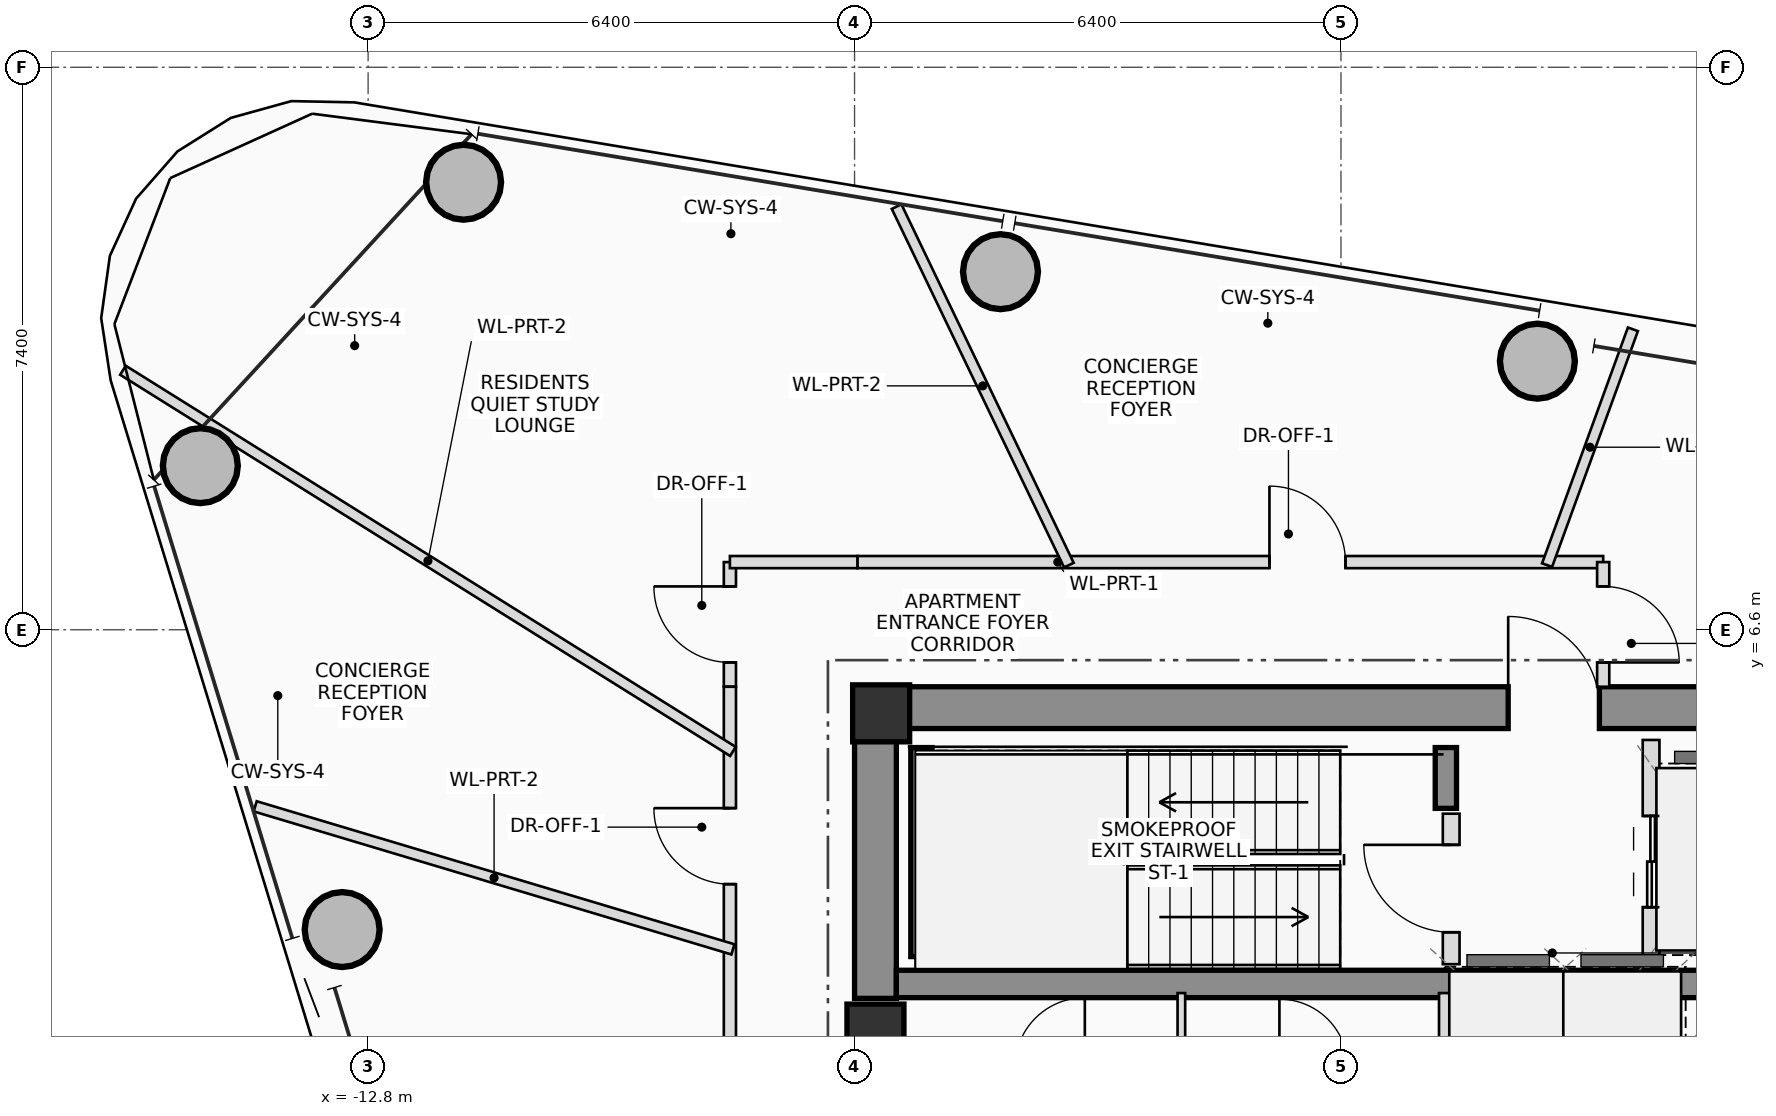
"""IFC4 building model, lengths in metres.
Left out: names, types, materials, properties, quantities, classifications, styles, units other than length and angle.
Written with IfcOpenShell. Run it as: python <this file> out.ifc"""

import sys

from ifc_helpers import new_model, si_unit, direction, frame, frame_2d, origin, origin_2d, place, context, subcontext, project, spatial, rectangle, hollow_circle, extrude, source, transform, mapped, element, fill, save


model = new_model("IFC4")
c1 = context("Model", 3, precision=1e-05, world=origin(), true_north=direction((0.0, 1.0)))
c2 = subcontext(c1, "Body", "Model", "MODEL_VIEW")
j1 = project(units=[si_unit("LENGTHUNIT", "METRE"), si_unit("PLANEANGLEUNIT", "RADIAN")], contexts=[c1])
p1 = place(None, origin())
s1 = spatial("IfcSite", under=j1, at=p1, CompositionType="ELEMENT")
p2 = place(p1, origin())
s2 = spatial("IfcBuilding", under=s1, at=p2, CompositionType="ELEMENT")
p3 = place(p2, frame((0.0, 0.0, 249.05)))
s3 = spatial("IfcBuildingStorey", under=s2, at=p3, CompositionType="ELEMENT", Elevation=249.05)
m1 = source(origin(), c2, "Body", "SweptSolid", [
    extrude(rectangle(XDim=0.75, YDim=0.75, at=origin_2d()), origin(), (0.0, 0.0, 1.0), 3.4),
])
p4 = place(p3, frame((-6.05, 5.5, 0.0), z_axis=(0.0, 0.0, 1.0), x_axis=(1.0, 0.0, 0.0)))
e1 = element("IfcColumn", 1, at=p4, inside=s3, PredefinedType="COLUMN", context=c2, shape_type="MappedRepresentation", body=[
    mapped(m1, transform((0.0, 0.0, 0.0), scale=1.0)),
])
p5 = place(p3, frame((-6.4, 5.575, 0.0), z_axis=(0.0, 0.0, 1.0), x_axis=(1.0, 0.0, 0.0)))
e2 = element("IfcWall", 2, at=p5, inside=s3, PredefinedType="SHEAR", context=c2, shape_type="SweptSolid", body=[
    extrude(rectangle(XDim=12.8, YDim=0.55, at=frame_2d((6.4, 0.0))), origin(), (0.0, 0.0, 1.0), 3.4),
])
p6 = place(p5, frame((8.6, 0.0, 0.0)))
e3 = element("IfcOpeningElement", 3, at=p6, cuts=e2, PredefinedType="OPENING", context=c2, shape_type="SweptSolid", body=[
    extrude(rectangle(XDim=1.2, YDim=2.2, at=frame_2d((0.6, 1.1))), frame((0.0, 0.285, 0.0), z_axis=(0.0, -1.0, 0.0), x_axis=(1.0, 0.0, 0.0)), (0.0, 0.0, 1.0), 0.57),
])
p7 = place(p3, frame((-6.125, 1.75, 0.0), z_axis=(0.0, 0.0, 1.0), x_axis=(0.0, 1.0, 0.0)))
e4 = element("IfcWall", 4, at=p7, inside=s3, PredefinedType="SHEAR", context=c2, shape_type="SweptSolid", body=[
    extrude(rectangle(XDim=3.55, YDim=0.55, at=frame_2d((1.775, 0.0))), origin(), (0.0, 0.0, 1.0), 3.4),
])
p8 = place(p3, frame((-5.85, 1.94, 0.0), z_axis=(0.0, 0.0, 1.0), x_axis=(1.0, 0.0, 0.0)))
e5 = element("IfcWall", 5, at=p8, inside=s3, PredefinedType="SHEAR", context=c2, shape_type="SweptSolid", body=[
    extrude(rectangle(XDim=11.7, YDim=0.36, at=frame_2d((5.85, 0.0))), origin(), (0.0, 0.0, 1.0), 3.4),
])
p9 = place(p3, frame((-5.52, 2.3, 0.0), z_axis=(0.0, 0.0, 1.0), x_axis=(0.0, 1.0, 0.0)))
e6 = element("IfcWall", 6, at=p9, inside=s3, PredefinedType="SHEAR", context=c2, shape_type="SweptSolid", body=[
    extrude(rectangle(XDim=2.75, YDim=0.28, at=frame_2d((1.375, 0.0))), origin(), (0.0, 0.0, 1.0), 3.4),
])
p10 = place(p3, frame((1.38, 4.25, 0.0), z_axis=(0.0, 0.0, 1.0), x_axis=(0.0, 1.0, 0.0)))
e7 = element("IfcWall", 7, at=p10, inside=s3, PredefinedType="SHEAR", context=c2, shape_type="SweptSolid", body=[
    extrude(rectangle(XDim=0.8, YDim=0.28, at=frame_2d((0.4, 0.0))), origin(), (0.0, 0.0, 1.0), 3.4),
])
p11 = place(p3, frame((-6.125, 1.3, 0.0), z_axis=(0.0, 0.0, 1.0), x_axis=(1.0, 0.0, 0.0)))
e8 = element("IfcColumn", 8, at=p11, inside=s3, PredefinedType="COLUMN", context=c2, shape_type="MappedRepresentation", body=[
    mapped(m1, transform((0.0, 0.0, 0.0), scale=1.0)),
])
m2 = source(origin(), c2, "Body", "SweptSolid", [
    extrude(hollow_circle(Radius=0.5, WallThickness=0.04, at=origin_2d()), origin(), (0.0, 0.0, 1.0), 3.4),
])
for number, where, z_axis, x_axis in (
    (9, (2.584, 10.134, 0.0), (0.0, 0.0, 1.0), (1.0, 0.0, 0.0)),
    (10, (-4.48, 11.311, 0.0), (0.0, 0.0, 1.0), (1.0, 0.0, 0.0)),
    (11, (-11.544, 12.488, 0.0), (0.0, 0.0, 1.0), (1.0, 0.0, 0.0)),
    (12, (-15.008, 8.759, 0.0), (0.0, 0.0, 1.0), (1.0, 0.0, 0.0)),
    (13, (-13.142, 2.656, 0.0), (0.0, 0.0, 1.0), (1.0, 0.0, 0.0)),
):
    element("IfcColumn", number, at=place(p3, frame(where, z_axis=z_axis, x_axis=x_axis)), inside=s3, PredefinedType="COLUMN", context=c2, shape_type="MappedRepresentation", body=[
        mapped(m2, transform((0.0, 0.0, 0.0), scale=1.0)),
    ])
p12 = place(p3, frame((1.45, 2.2, 0.0), z_axis=(0.0, 0.0, 1.0), x_axis=(0.0, 1.0, 0.0)))
e14 = element("IfcWall", 14, at=p12, inside=s3, PredefinedType="PLUMBINGWALL", context=c2, shape_type="SweptSolid", body=[
    extrude(rectangle(XDim=1.98, YDim=0.22, at=frame_2d((0.99, 0.0))), origin(), (0.0, 0.0, 1.0), 3.16),
])
p13 = place(p12, frame((0.42, 0.0, 0.0)))
e15 = element("IfcOpeningElement", 15, at=p13, cuts=e14, PredefinedType="OPENING", context=c2, shape_type="SweptSolid", body=[
    extrude(rectangle(XDim=1.15, YDim=2.15, at=frame_2d((0.575, 1.075))), frame((0.0, 0.12, 0.0), z_axis=(0.0, -1.0, 0.0), x_axis=(1.0, 0.0, 0.0)), (0.0, 0.0, 1.0), 0.24),
])
p14 = place(p3, frame((4.08, 2.2, 0.0), z_axis=(0.0, 0.0, 1.0), x_axis=(0.0, 1.0, 0.0)))
e16 = element("IfcWall", 16, at=p14, inside=s3, PredefinedType="PLUMBINGWALL", context=c2, shape_type="SweptSolid", body=[
    extrude(rectangle(XDim=2.95, YDim=0.22, at=frame_2d((1.475, 0.0))), origin(), (0.0, 0.0, 1.0), 3.16),
])
p15 = place(p14, frame((0.75, 0.0, 0.0)))
e17 = element("IfcOpeningElement", 17, at=p15, cuts=e16, PredefinedType="OPENING", context=c2, shape_type="SweptSolid", body=[
    extrude(rectangle(XDim=1.2, YDim=2.25, at=frame_2d((0.6, 1.125))), frame((0.0, 0.12, 0.0), z_axis=(0.0, -1.0, 0.0), x_axis=(1.0, 0.0, 0.0)), (0.0, 0.0, 1.0), 0.24),
])
p16 = place(p3, frame((-2.1, 0.84, 0.0), z_axis=(0.0, 0.0, 1.0), x_axis=(0.0, 1.0, 0.0)))
e18 = element("IfcWall", 18, at=p16, inside=s3, PredefinedType="PARTITIONING", context=c2, shape_type="SweptSolid", body=[
    extrude(rectangle(XDim=0.98, YDim=0.1, at=frame_2d((0.49, 0.0))), origin(), (0.0, 0.0, 1.0), 3.16),
])
for number, where, z_axis, x_axis in (
    (19, (1.38, 0.84, 0.0), (0.0, 0.0, 1.0), (0.0, 1.0, 0.0)),
    (20, (3.02, 0.84, 0.0), (0.0, 0.0, 1.0), (0.0, 1.0, 0.0)),
    (21, (4.38, 0.84, 0.0), (0.0, 0.0, 1.0), (0.0, 1.0, 0.0)),
):
    element("IfcWall", number, at=place(p3, frame(where, z_axis=z_axis, x_axis=x_axis)), inside=s3, PredefinedType="PLUMBINGWALL", context=c2, shape_type="SweptSolid", body=[
        extrude(rectangle(XDim=0.98, YDim=0.18, at=frame_2d((0.49, 0.0))), origin(), (0.0, 0.0, 1.0), 3.16),
    ])
p17 = place(p3, frame((-8.04, 5.85, 0.0), z_axis=(0.0, 0.0, 1.0), x_axis=(0.0, 1.0, 0.0)))
e22 = element("IfcWall", 22, at=p17, inside=s3, PredefinedType="PARTITIONING", context=c2, shape_type="SweptSolid", body=[
    extrude(rectangle(XDim=1.64, YDim=0.16, at=frame_2d((0.82, 0.0))), origin(), (0.0, 0.0, 1.0), 2.565),
])
p18 = place(p17, frame((0.32, 0.0, 0.0)))
e23 = element("IfcOpeningElement", 23, at=p18, cuts=e22, PredefinedType="OPENING", context=c2, shape_type="SweptSolid", body=[
    extrude(rectangle(XDim=1.0, YDim=2.25, at=frame_2d((0.5, 1.125))), frame((0.0, 0.09, 0.0), z_axis=(0.0, -1.0, 0.0), x_axis=(1.0, 0.0, 0.0)), (0.0, 0.0, 1.0), 0.18),
])
p19 = place(p3, frame((-8.04, 7.49, 0.0), z_axis=(0.0, 0.0, 1.0), x_axis=(1.0, 0.0, 0.0)))
e24 = element("IfcWall", 24, at=p19, inside=s3, PredefinedType="PARTITIONING", context=c2, shape_type="SweptSolid", body=[
    extrude(rectangle(XDim=1.68, YDim=0.16, at=frame_2d((0.84, 0.0))), origin(), (0.0, 0.0, 1.0), 2.565),
])
p20 = place(p3, frame((-6.36, 7.49, 0.0), z_axis=(0.0, 0.0, 1.0), x_axis=(1.0, 0.0, 0.0)))
e25 = element("IfcWall", 25, at=p20, inside=s3, PredefinedType="PARTITIONING", context=c2, shape_type="SweptSolid", body=[
    extrude(rectangle(XDim=9.81, YDim=0.16, at=frame_2d((4.905, 0.0))), origin(), (0.0, 0.0, 1.0), 2.565),
])
p21 = place(p20, frame((5.419, 0.0, 0.0)))
e26 = element("IfcOpeningElement", 26, at=p21, cuts=e25, PredefinedType="OPENING", context=c2, shape_type="SweptSolid", body=[
    extrude(rectangle(XDim=1.0, YDim=2.25, at=frame_2d((0.5, 1.125))), frame((0.0, 0.09, 0.0), z_axis=(0.0, -1.0, 0.0), x_axis=(1.0, 0.0, 0.0)), (0.0, 0.0, 1.0), 0.18),
])
p22 = place(p3, frame((3.45, 7.49, 0.0), z_axis=(0.0, 0.0, 1.0), x_axis=(0.0, -1.0, 0.0)))
e27 = element("IfcWall", 27, at=p22, inside=s3, PredefinedType="PARTITIONING", context=c2, shape_type="SweptSolid", body=[
    extrude(rectangle(XDim=1.64, YDim=0.16, at=frame_2d((0.82, 0.0))), origin(), (0.0, 0.0, 1.0), 3.16),
])
p23 = place(p22, frame((0.32, 0.0, 0.0)))
e28 = element("IfcOpeningElement", 28, at=p23, cuts=e27, PredefinedType="OPENING", context=c2, shape_type="SweptSolid", body=[
    extrude(rectangle(XDim=1.0, YDim=2.25, at=frame_2d((0.5, 1.125))), frame((0.0, 0.09, 0.0), z_axis=(0.0, -1.0, 0.0), x_axis=(1.0, 0.0, 0.0)), (0.0, 0.0, 1.0), 0.18),
])
p24 = place(p3, frame((-8.04, -5.85, 0.0), z_axis=(0.0, 0.0, 1.0), x_axis=(0.0, 1.0, 0.0)))
e29 = element("IfcWall", 29, at=p24, inside=s3, PredefinedType="PARTITIONING", context=c2, shape_type="SweptSolid", body=[
    extrude(rectangle(XDim=11.7, YDim=0.16, at=frame_2d((5.85, 0.0))), origin(), (0.0, 0.0, 1.0), 2.565),
])
p25 = place(p24, frame((1.754, 0.0, 0.0)))
e30 = element("IfcOpeningElement", 30, at=p25, cuts=e29, PredefinedType="OPENING", context=c2, shape_type="SweptSolid", body=[
    extrude(rectangle(XDim=1.0, YDim=2.25, at=frame_2d((0.5, 1.125))), frame((0.0, 0.09, 0.0), z_axis=(0.0, -1.0, 0.0), x_axis=(1.0, 0.0, 0.0)), (0.0, 0.0, 1.0), 0.18),
])
p26 = place(p24, frame((5.8, 0.0, 0.0)))
e31 = element("IfcOpeningElement", 31, at=p26, cuts=e29, PredefinedType="OPENING", context=c2, shape_type="SweptSolid", body=[
    extrude(rectangle(XDim=1.0, YDim=2.25, at=frame_2d((0.5, 1.125))), frame((0.0, 0.09, 0.0), z_axis=(0.0, -1.0, 0.0), x_axis=(1.0, 0.0, 0.0)), (0.0, 0.0, 1.0), 0.18),
])
p27 = place(p24, frame((9.103, 0.0, 0.0)))
e32 = element("IfcOpeningElement", 32, at=p27, cuts=e29, PredefinedType="OPENING", context=c2, shape_type="SweptSolid", body=[
    extrude(rectangle(XDim=1.0, YDim=2.25, at=frame_2d((0.5, 1.125))), frame((0.0, 0.09, 0.0), z_axis=(0.0, -1.0, 0.0), x_axis=(1.0, 0.0, 0.0)), (0.0, 0.0, 1.0), 0.18),
])
p28 = place(p3, frame((2.712, 7.45, 0.0), z_axis=(0.0, 0.0, 1.0), x_axis=(0.341974588874, 0.9397092, 0.0)))
e33 = element("IfcWall", 33, at=p28, inside=s3, PredefinedType="PARTITIONING", context=c2, shape_type="SweptSolid", body=[
    extrude(rectangle(XDim=3.302, YDim=0.14, at=frame_2d((1.651, 0.0))), origin(), (0.0, 0.0, 1.0), 2.565),
])
p29 = place(p3, frame((-3.58, 7.45, 0.0), z_axis=(0.0, 0.0, 1.0), x_axis=(-0.433107149182, 0.901342441765, 0.0)))
e34 = element("IfcWall", 34, at=p29, inside=s3, PredefinedType="PARTITIONING", context=c2, shape_type="SweptSolid", body=[
    extrude(rectangle(XDim=5.233, YDim=0.14, at=frame_2d((2.617, 0.0))), origin(), (0.0, 0.0, 1.0), 2.565),
])
p30 = place(p3, frame((-8.0, 4.999, 0.0), z_axis=(0.0, 0.0, 1.0), x_axis=(-0.848044679887, 0.529924731369, 0.0)))
e35 = element("IfcWall", 35, at=p30, inside=s3, PredefinedType="PARTITIONING", context=c2, shape_type="SweptSolid", body=[
    extrude(rectangle(XDim=9.463, YDim=0.14, at=frame_2d((4.732, 0.0))), origin(), (0.0, 0.0, 1.0), 2.565),
])
p31 = place(p3, frame((-8.0, 2.395, 0.0), z_axis=(0.0, 0.0, 1.0), x_axis=(-0.957987942155, 0.286808477361, 0.0)))
e36 = element("IfcWall", 36, at=p31, inside=s3, PredefinedType="PARTITIONING", context=c2, shape_type="SweptSolid", body=[
    extrude(rectangle(XDim=6.561, YDim=0.14, at=frame_2d((3.281, 0.0))), origin(), (0.0, 0.0, 1.0), 2.565),
])
p32 = place(p6, origin())
e37 = element("IfcDoor", 37, at=p32, inside=s3, OperationType="SINGLE_SWING_LEFT", PredefinedType="DOOR", context=c2, shape_type="SweptSolid", body=[
    extrude(rectangle(XDim=1.2, YDim=2.2, at=frame_2d((0.6, 1.1))), frame((0.0, 0.025, 0.0), z_axis=(0.0, -1.0, 0.0), x_axis=(1.0, 0.0, 0.0)), (0.0, 0.0, 1.0), 0.05),
])
fill(e3, e37)
p33 = place(p13, origin())
e38 = element("IfcDoor", 38, at=p33, inside=s3, OperationType="SINGLE_SWING_RIGHT", PredefinedType="DOOR", context=c2, shape_type="SweptSolid", body=[
    extrude(rectangle(XDim=1.15, YDim=2.15, at=frame_2d((0.575, 1.075))), frame((0.0, 0.025, 0.0), z_axis=(0.0, -1.0, 0.0), x_axis=(1.0, 0.0, 0.0)), (0.0, 0.0, 1.0), 0.05),
])
fill(e15, e38)
p34 = place(p15, origin())
e39 = element("IfcDoor", 39, at=p34, inside=s3, OperationType="DOUBLE_DOOR_SLIDING", PredefinedType="DOOR", context=c2, shape_type="SweptSolid", body=[
    extrude(rectangle(XDim=1.2, YDim=2.25, at=frame_2d((0.6, 1.125))), frame((0.0, 0.025, 0.0), z_axis=(0.0, -1.0, 0.0), x_axis=(1.0, 0.0, 0.0)), (0.0, 0.0, 1.0), 0.05),
])
fill(e17, e39)
p35 = place(p18, origin())
e40 = element("IfcDoor", 40, at=p35, inside=s3, OperationType="SINGLE_SWING_RIGHT", PredefinedType="DOOR", context=c2, shape_type="SweptSolid", body=[
    extrude(rectangle(XDim=1.0, YDim=2.25, at=frame_2d((0.5, 1.125))), frame((0.0, 0.025, 0.0), z_axis=(0.0, -1.0, 0.0), x_axis=(1.0, 0.0, 0.0)), (0.0, 0.0, 1.0), 0.05),
])
fill(e23, e40)
p36 = place(p21, origin())
e41 = element("IfcDoor", 41, at=p36, inside=s3, OperationType="SINGLE_SWING_LEFT", PredefinedType="DOOR", context=c2, shape_type="SweptSolid", body=[
    extrude(rectangle(XDim=1.0, YDim=2.25, at=frame_2d((0.5, 1.125))), frame((0.0, 0.025, 0.0), z_axis=(0.0, -1.0, 0.0), x_axis=(1.0, 0.0, 0.0)), (0.0, 0.0, 1.0), 0.05),
])
fill(e26, e41)
p37 = place(p23, origin())
e42 = element("IfcDoor", 42, at=p37, inside=s3, OperationType="SINGLE_SWING_RIGHT", PredefinedType="DOOR", context=c2, shape_type="SweptSolid", body=[
    extrude(rectangle(XDim=1.0, YDim=2.25, at=frame_2d((0.5, 1.125))), frame((0.0, 0.025, 0.0), z_axis=(0.0, -1.0, 0.0), x_axis=(1.0, 0.0, 0.0)), (0.0, 0.0, 1.0), 0.05),
])
fill(e28, e42)
p38 = place(p27, origin())
e43 = element("IfcDoor", 43, at=p38, inside=s3, OperationType="SINGLE_SWING_RIGHT", PredefinedType="DOOR", context=c2, shape_type="SweptSolid", body=[
    extrude(rectangle(XDim=1.0, YDim=2.25, at=frame_2d((0.5, 1.125))), frame((0.0, 0.025, 0.0), z_axis=(0.0, -1.0, 0.0), x_axis=(1.0, 0.0, 0.0)), (0.0, 0.0, 1.0), 0.05),
])
fill(e32, e43)
save(model, sys.argv[1])
